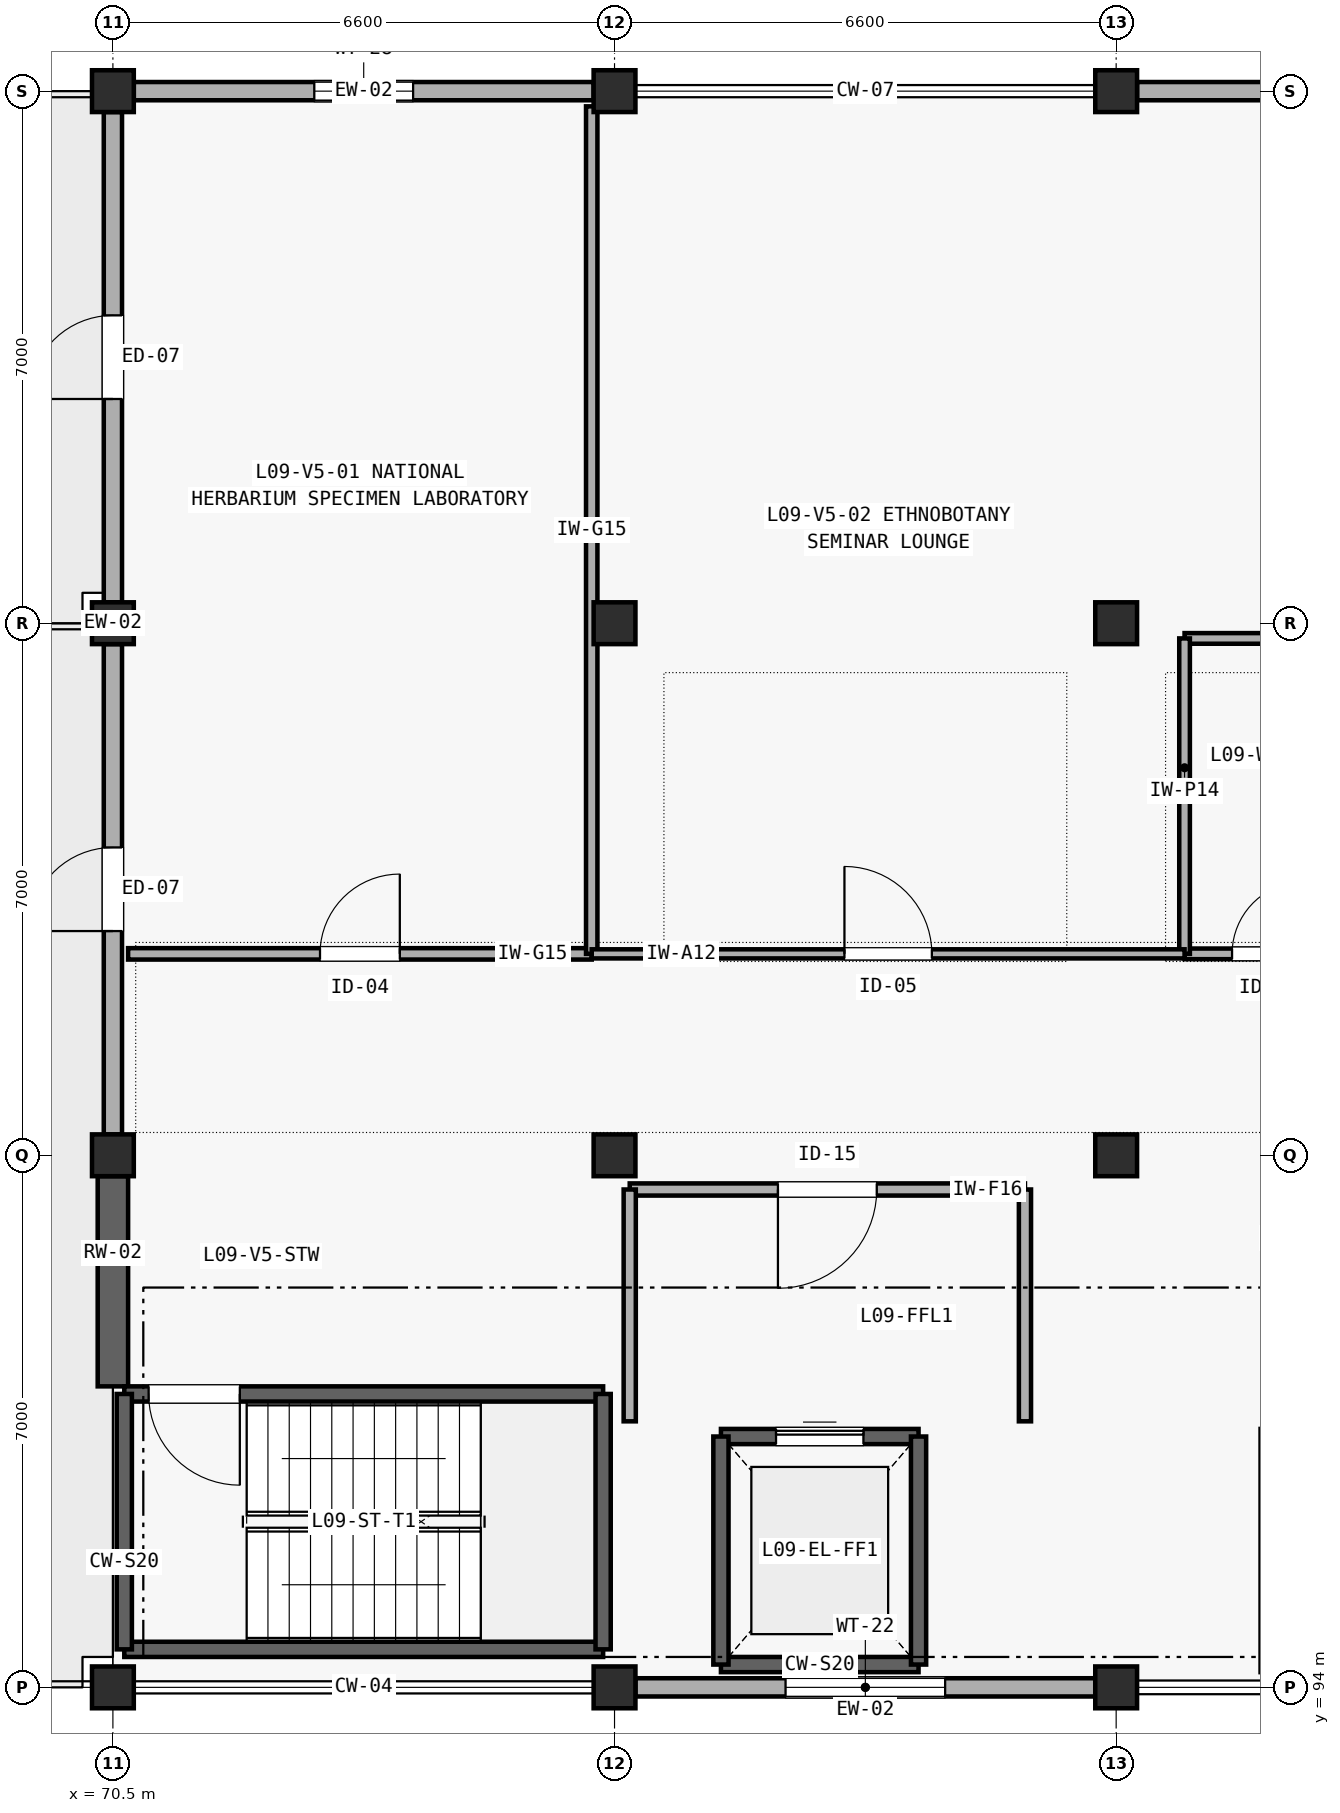
"""IFC4 building model, lengths in metres.
Left out: names, types, materials, properties, quantities, classifications, styles, units other than length and angle.
Written with IfcOpenShell. Run it as: python <this file> out.ifc"""

import sys

from ifc_helpers import new_model, si_unit, direction, frame, frame_2d, origin, origin_2d, place, context, subcontext, project, spatial, rectangle, extrude, element, fill, save


model = new_model("IFC4")
c1 = context("Model", 3, precision=1e-05, world=origin(), true_north=direction((0.0, 1.0)))
c2 = subcontext(c1, "Body", "Model", "MODEL_VIEW")
j1 = project(units=[si_unit("LENGTHUNIT", "METRE"), si_unit("PLANEANGLEUNIT", "RADIAN")], contexts=[c1])
p1 = place(None, origin())
s1 = spatial("IfcSite", under=j1, at=p1, CompositionType="ELEMENT")
p2 = place(p1, origin())
s2 = spatial("IfcBuilding", under=s1, at=p2, CompositionType="ELEMENT")
p3 = place(p2, frame((0.0, 0.0, 37.8)))
s3 = spatial("IfcBuildingStorey", under=s2, at=p3, CompositionType="ELEMENT", Elevation=37.8)
for number, where, z_axis, x_axis in (
    (1, (70.5, 94.0, 0.0), (0.0, 0.0, 1.0), (1.0, 0.0, 0.0)),
    (2, (70.5, 101.0, 0.0), (0.0, 0.0, 1.0), (1.0, 0.0, 0.0)),
    (3, (70.5, 108.0, 0.0), (0.0, 0.0, 1.0), (1.0, 0.0, 0.0)),
    (4, (70.5, 115.0, 0.0), (0.0, 0.0, 1.0), (1.0, 0.0, 0.0)),
    (5, (77.1, 94.0, 0.0), (0.0, 0.0, 1.0), (1.0, 0.0, 0.0)),
    (6, (77.1, 101.0, 0.0), (0.0, 0.0, 1.0), (1.0, 0.0, 0.0)),
    (7, (77.1, 108.0, 0.0), (0.0, 0.0, 1.0), (1.0, 0.0, 0.0)),
    (8, (77.1, 115.0, 0.0), (0.0, 0.0, 1.0), (1.0, 0.0, 0.0)),
    (9, (83.7, 94.0, 0.0), (0.0, 0.0, 1.0), (1.0, 0.0, 0.0)),
    (10, (83.7, 101.0, 0.0), (0.0, 0.0, 1.0), (1.0, 0.0, 0.0)),
    (11, (83.7, 108.0, 0.0), (0.0, 0.0, 1.0), (1.0, 0.0, 0.0)),
    (12, (83.7, 115.0, 0.0), (0.0, 0.0, 1.0), (1.0, 0.0, 0.0)),
):
    element("IfcColumn", number, at=place(p3, frame(where, z_axis=z_axis, x_axis=x_axis)), inside=s3, PredefinedType="COLUMN", context=c2, shape_type="SweptSolid", body=[
        extrude(rectangle(XDim=0.55, YDim=0.55, at=origin_2d()), origin(), (0.0, 0.0, 1.0), 4.2),
    ])
p4 = place(p3, frame((77.375, 94.0, 0.0), z_axis=(0.0, 0.0, 1.0), x_axis=(1.0, 0.0, 0.0)))
e13 = element("IfcWall", 13, at=p4, inside=s3, PredefinedType="SOLIDWALL", context=c2, shape_type="SweptSolid", body=[
    extrude(rectangle(XDim=6.05, YDim=0.24, at=frame_2d((3.025, 0.0))), origin(), (0.0, 0.0, 1.0), 3.365),
])
p5 = place(p4, frame((1.975, 0.0, 0.85)))
e14 = element("IfcOpeningElement", 14, at=p5, cuts=e13, PredefinedType="OPENING", context=c2, shape_type="SweptSolid", body=[
    extrude(rectangle(XDim=2.1, YDim=1.6, at=frame_2d((1.05, 0.8))), frame((0.0, 0.13, 0.0), z_axis=(0.0, -1.0, 0.0), x_axis=(1.0, 0.0, 0.0)), (0.0, 0.0, 1.0), 0.26),
])
p6 = place(p3, frame((70.775, 115.0, 0.0), z_axis=(0.0, 0.0, 1.0), x_axis=(1.0, 0.0, 0.0)))
e15 = element("IfcWall", 15, at=p6, inside=s3, PredefinedType="SOLIDWALL", context=c2, shape_type="SweptSolid", body=[
    extrude(rectangle(XDim=6.05, YDim=0.24, at=frame_2d((3.025, 0.0))), origin(), (0.0, 0.0, 1.0), 3.285),
])
p7 = place(p6, frame((2.375, 0.0, 0.85)))
e16 = element("IfcOpeningElement", 16, at=p7, cuts=e15, PredefinedType="OPENING", context=c2, shape_type="SweptSolid", body=[
    extrude(rectangle(XDim=1.3, YDim=1.45, at=frame_2d((0.65, 0.725))), frame((0.0, 0.13, 0.0), z_axis=(0.0, -1.0, 0.0), x_axis=(1.0, 0.0, 0.0)), (0.0, 0.0, 1.0), 0.26),
])
p8 = place(p3, frame((83.975, 115.0, 0.0), z_axis=(0.0, 0.0, 1.0), x_axis=(1.0, 0.0, 0.0)))
e17 = element("IfcWall", 17, at=p8, inside=s3, PredefinedType="SOLIDWALL", context=c2, shape_type="SweptSolid", body=[
    extrude(rectangle(XDim=6.05, YDim=0.24, at=frame_2d((3.025, 0.0))), origin(), (0.0, 0.0, 1.0), 3.385),
])
p9 = place(p8, frame((1.925, 0.0, 0.85)))
e18 = element("IfcOpeningElement", 18, at=p9, cuts=e17, PredefinedType="OPENING", context=c2, shape_type="SweptSolid", body=[
    extrude(rectangle(XDim=2.2, YDim=1.2, at=frame_2d((1.1, 0.6))), frame((0.0, 0.13, 0.0), z_axis=(0.0, -1.0, 0.0), x_axis=(1.0, 0.0, 0.0)), (0.0, 0.0, 1.0), 0.26),
])
p10 = place(p3, frame((70.5, 97.96, 0.0), z_axis=(0.0, 0.0, 1.0), x_axis=(0.0, 1.0, 0.0)))
e19 = element("IfcWall", 19, at=p10, inside=s3, PredefinedType="SHEAR", context=c2, shape_type="SweptSolid", body=[
    extrude(rectangle(XDim=2.765, YDim=0.4, at=frame_2d((1.383, 0.0))), origin(), (0.0, 0.0, 1.0), 3.85),
])
p11 = place(p3, frame((70.5, 101.275, 0.0), z_axis=(0.0, 0.0, 1.0), x_axis=(0.0, 1.0, 0.0)))
e20 = element("IfcWall", 20, at=p11, inside=s3, PredefinedType="SOLIDWALL", context=c2, shape_type="SweptSolid", body=[
    extrude(rectangle(XDim=6.45, YDim=0.24, at=frame_2d((3.225, 0.0))), origin(), (0.0, 0.0, 1.0), 3.465),
])
p12 = place(p11, frame((2.675, 0.0, 0.0)))
e21 = element("IfcOpeningElement", 21, at=p12, cuts=e20, PredefinedType="OPENING", context=c2, shape_type="SweptSolid", body=[
    extrude(rectangle(XDim=1.1, YDim=2.1, at=frame_2d((0.55, 1.05))), frame((0.0, 0.13, 0.0), z_axis=(0.0, -1.0, 0.0), x_axis=(1.0, 0.0, 0.0)), (0.0, 0.0, 1.0), 0.26),
])
p13 = place(p3, frame((70.5, 108.275, 0.0), z_axis=(0.0, 0.0, 1.0), x_axis=(0.0, 1.0, 0.0)))
e22 = element("IfcWall", 22, at=p13, inside=s3, PredefinedType="SOLIDWALL", context=c2, shape_type="SweptSolid", body=[
    extrude(rectangle(XDim=6.45, YDim=0.24, at=frame_2d((3.225, 0.0))), origin(), (0.0, 0.0, 1.0), 3.465),
])
p14 = place(p13, frame((2.675, 0.0, 0.0)))
e23 = element("IfcOpeningElement", 23, at=p14, cuts=e22, PredefinedType="OPENING", context=c2, shape_type="SweptSolid", body=[
    extrude(rectangle(XDim=1.1, YDim=2.1, at=frame_2d((0.55, 1.05))), frame((0.0, 0.13, 0.0), z_axis=(0.0, -1.0, 0.0), x_axis=(1.0, 0.0, 0.0)), (0.0, 0.0, 1.0), 0.26),
])
p15 = place(p3, frame((70.65, 94.5, 0.0), z_axis=(0.0, 0.0, 1.0), x_axis=(1.0, 0.0, 0.0)))
e24 = element("IfcWall", 24, at=p15, inside=s3, PredefinedType="SHEAR", context=c2, shape_type="SweptSolid", body=[
    extrude(rectangle(XDim=6.3, YDim=0.2, at=frame_2d((3.15, 0.0))), origin(), (0.0, 0.0, 1.0), 4.2),
])
p16 = place(p3, frame((70.65, 97.86, 0.0), z_axis=(0.0, 0.0, 1.0), x_axis=(1.0, 0.0, 0.0)))
e25 = element("IfcWall", 25, at=p16, inside=s3, PredefinedType="SHEAR", context=c2, shape_type="SweptSolid", body=[
    extrude(rectangle(XDim=6.3, YDim=0.2, at=frame_2d((3.15, 0.0))), origin(), (0.0, 0.0, 1.0), 4.2),
])
p17 = place(p16, frame((0.32, 0.0, 0.0)))
e26 = element("IfcOpeningElement", 26, at=p17, cuts=e25, PredefinedType="OPENING", context=c2, shape_type="SweptSolid", body=[
    extrude(rectangle(XDim=1.2, YDim=2.15, at=frame_2d((0.6, 1.075))), frame((0.0, 0.11, 0.0), z_axis=(0.0, -1.0, 0.0), x_axis=(1.0, 0.0, 0.0)), (0.0, 0.0, 1.0), 0.22),
])
for number, where, z_axis, x_axis in (
    (27, (70.65, 94.5, 0.0), (0.0, 0.0, 1.0), (0.0, 1.0, 0.0)),
    (28, (76.95, 94.5, 0.0), (0.0, 0.0, 1.0), (0.0, 1.0, 0.0)),
):
    element("IfcWall", number, at=place(p3, frame(where, z_axis=z_axis, x_axis=x_axis)), inside=s3, PredefinedType="SHEAR", context=c2, shape_type="SweptSolid", body=[
        extrude(rectangle(XDim=3.36, YDim=0.2, at=frame_2d((1.68, 0.0))), origin(), (0.0, 0.0, 1.0), 4.2),
    ])
p18 = place(p3, frame((78.5, 94.3, 0.0), z_axis=(0.0, 0.0, 1.0), x_axis=(1.0, 0.0, 0.0)))
e29 = element("IfcWall", 29, at=p18, inside=s3, PredefinedType="SHEAR", context=c2, shape_type="SweptSolid", body=[
    extrude(rectangle(XDim=2.6, YDim=0.2, at=frame_2d((1.3, 0.0))), origin(), (0.0, 0.0, 1.0), 4.2),
])
p19 = place(p3, frame((78.5, 97.3, 0.0), z_axis=(0.0, 0.0, 1.0), x_axis=(1.0, 0.0, 0.0)))
e30 = element("IfcWall", 30, at=p19, inside=s3, PredefinedType="SHEAR", context=c2, shape_type="SweptSolid", body=[
    extrude(rectangle(XDim=2.6, YDim=0.2, at=frame_2d((1.3, 0.0))), origin(), (0.0, 0.0, 1.0), 4.2),
])
p20 = place(p19, frame((0.725, 0.0, 0.0)))
e31 = element("IfcOpeningElement", 31, at=p20, cuts=e30, PredefinedType="OPENING", context=c2, shape_type="SweptSolid", body=[
    extrude(rectangle(XDim=1.15, YDim=2.2, at=frame_2d((0.575, 1.1))), frame((0.0, 0.11, 0.0), z_axis=(0.0, -1.0, 0.0), x_axis=(1.0, 0.0, 0.0)), (0.0, 0.0, 1.0), 0.22),
])
for number, where, z_axis, x_axis in (
    (32, (78.5, 94.3, 0.0), (0.0, 0.0, 1.0), (0.0, 1.0, 0.0)),
    (33, (81.1, 94.3, 0.0), (0.0, 0.0, 1.0), (0.0, 1.0, 0.0)),
):
    element("IfcWall", number, at=place(p3, frame(where, z_axis=z_axis, x_axis=x_axis)), inside=s3, PredefinedType="SHEAR", context=c2, shape_type="SweptSolid", body=[
        extrude(rectangle(XDim=3.0, YDim=0.2, at=frame_2d((1.5, 0.0))), origin(), (0.0, 0.0, 1.0), 4.2),
    ])
p21 = place(p3, frame((85.7, 94.2, 0.0), z_axis=(0.0, 0.0, 1.0), x_axis=(0.0, 1.0, 0.0)))
e34 = element("IfcWall", 34, at=p21, inside=s3, PredefinedType="SHEAR", context=c2, shape_type="SweptSolid", body=[
    extrude(rectangle(XDim=3.2, YDim=0.2, at=frame_2d((1.6, 0.0))), origin(), (0.0, 0.0, 1.0), 4.2),
])
p22 = place(p3, frame((77.3, 100.55, 0.0), z_axis=(0.0, 0.0, 1.0), x_axis=(1.0, 0.0, 0.0)))
e35 = element("IfcWall", 35, at=p22, inside=s3, PredefinedType="SOLIDWALL", context=c2, shape_type="SweptSolid", body=[
    extrude(rectangle(XDim=5.2, YDim=0.16, at=frame_2d((2.6, 0.0))), origin(), (0.0, 0.0, 1.0), 3.9),
])
p23 = place(p22, frame((1.95, 0.0, 0.0)))
e36 = element("IfcOpeningElement", 36, at=p23, cuts=e35, PredefinedType="OPENING", context=c2, shape_type="SweptSolid", body=[
    extrude(rectangle(XDim=1.3, YDim=2.15, at=frame_2d((0.65, 1.075))), frame((0.0, 0.09, 0.0), z_axis=(0.0, -1.0, 0.0), x_axis=(1.0, 0.0, 0.0)), (0.0, 0.0, 1.0), 0.18),
])
p24 = place(p3, frame((77.3, 97.5, 0.0), z_axis=(0.0, 0.0, 1.0), x_axis=(0.0, 1.0, 0.0)))
e37 = element("IfcWall", 37, at=p24, inside=s3, PredefinedType="SOLIDWALL", context=c2, shape_type="SweptSolid", body=[
    extrude(rectangle(XDim=3.05, YDim=0.16, at=frame_2d((1.525, 0.0))), origin(), (0.0, 0.0, 1.0), 3.405),
])
p25 = place(p3, frame((82.5, 97.5, 0.0), z_axis=(0.0, 0.0, 1.0), x_axis=(0.0, 1.0, 0.0)))
e38 = element("IfcWall", 38, at=p25, inside=s3, PredefinedType="SOLIDWALL", context=c2, shape_type="SweptSolid", body=[
    extrude(rectangle(XDim=3.05, YDim=0.16, at=frame_2d((1.525, 0.0))), origin(), (0.0, 0.0, 1.0), 3.9),
])
p26 = place(p3, frame((84.6, 103.65, 0.0), z_axis=(0.0, 0.0, 1.0), x_axis=(1.0, 0.0, 0.0)))
e39 = element("IfcWall", 39, at=p26, inside=s3, PredefinedType="PLUMBINGWALL", context=c2, shape_type="SweptSolid", body=[
    extrude(rectangle(XDim=2.2, YDim=0.14, at=frame_2d((1.1, 0.0))), origin(), (0.0, 0.0, 1.0), 3.9),
])
p27 = place(p26, frame((0.625, 0.0, 0.0)))
e40 = element("IfcOpeningElement", 40, at=p27, cuts=e39, PredefinedType="OPENING", context=c2, shape_type="SweptSolid", body=[
    extrude(rectangle(XDim=0.95, YDim=2.1, at=frame_2d((0.475, 1.05))), frame((0.0, 0.08, 0.0), z_axis=(0.0, -1.0, 0.0), x_axis=(1.0, 0.0, 0.0)), (0.0, 0.0, 1.0), 0.16),
])
p28 = place(p3, frame((84.6, 107.8, 0.0), z_axis=(0.0, 0.0, 1.0), x_axis=(1.0, 0.0, 0.0)))
e41 = element("IfcWall", 41, at=p28, inside=s3, PredefinedType="PLUMBINGWALL", context=c2, shape_type="SweptSolid", body=[
    extrude(rectangle(XDim=2.2, YDim=0.14, at=frame_2d((1.1, 0.0))), origin(), (0.0, 0.0, 1.0), 3.385),
])
p29 = place(p3, frame((84.6, 103.65, 0.0), z_axis=(0.0, 0.0, 1.0), x_axis=(0.0, 1.0, 0.0)))
e42 = element("IfcWall", 42, at=p29, inside=s3, PredefinedType="PLUMBINGWALL", context=c2, shape_type="SweptSolid", body=[
    extrude(rectangle(XDim=4.15, YDim=0.14, at=frame_2d((2.075, 0.0))), origin(), (0.0, 0.0, 1.0), 3.9),
])
p30 = place(p3, frame((70.7, 103.65, 0.0), z_axis=(0.0, 0.0, 1.0), x_axis=(1.0, 0.0, 0.0)))
e43 = element("IfcWall", 43, at=p30, inside=s3, PredefinedType="PARTITIONING", context=c2, shape_type="SweptSolid", body=[
    extrude(rectangle(XDim=6.1, YDim=0.15, at=frame_2d((3.05, 0.0))), origin(), (0.0, 0.0, 1.0), 3.9),
])
p31 = place(p30, frame((2.525, 0.0, 0.0)))
e44 = element("IfcOpeningElement", 44, at=p31, cuts=e43, PredefinedType="OPENING", context=c2, shape_type="SweptSolid", body=[
    extrude(rectangle(XDim=1.05, YDim=2.15, at=frame_2d((0.525, 1.075))), frame((0.0, 0.085, 0.0), z_axis=(0.0, -1.0, 0.0), x_axis=(1.0, 0.0, 0.0)), (0.0, 0.0, 1.0), 0.17),
])
p32 = place(p3, frame((76.8, 103.65, 0.0), z_axis=(0.0, 0.0, 1.0), x_axis=(0.0, 1.0, 0.0)))
e45 = element("IfcWall", 45, at=p32, inside=s3, PredefinedType="PARTITIONING", context=c2, shape_type="SweptSolid", body=[
    extrude(rectangle(XDim=11.15, YDim=0.15, at=frame_2d((5.575, 0.0))), origin(), (0.0, 0.0, 1.0), 3.9),
])
p33 = place(p3, frame((76.8, 103.65, 0.0), z_axis=(0.0, 0.0, 1.0), x_axis=(1.0, 0.0, 0.0)))
e46 = element("IfcWall", 46, at=p33, inside=s3, PredefinedType="PARTITIONING", context=c2, shape_type="SweptSolid", body=[
    extrude(rectangle(XDim=7.8, YDim=0.12, at=frame_2d((3.9, 0.0))), origin(), (0.0, 0.0, 1.0), 3.9),
])
p34 = place(p33, frame((3.325, 0.0, 0.0)))
e47 = element("IfcOpeningElement", 47, at=p34, cuts=e46, PredefinedType="OPENING", context=c2, shape_type="SweptSolid", body=[
    extrude(rectangle(XDim=1.15, YDim=2.15, at=frame_2d((0.575, 1.075))), frame((0.0, 0.07, 0.0), z_axis=(0.0, -1.0, 0.0), x_axis=(1.0, 0.0, 0.0)), (0.0, 0.0, 1.0), 0.14),
])
p35 = place(p5, origin())
e48 = element("IfcWindow", 48, at=p35, inside=s3, PartitioningType="SINGLE_PANEL", PredefinedType="WINDOW", context=c2, shape_type="SweptSolid", body=[
    extrude(rectangle(XDim=2.1, YDim=1.6, at=frame_2d((1.05, 0.8))), frame((0.0, 0.03, 0.0), z_axis=(0.0, -1.0, 0.0), x_axis=(1.0, 0.0, 0.0)), (0.0, 0.0, 1.0), 0.06),
])
fill(e14, e48)
p36 = place(p7, origin())
e49 = element("IfcWindow", 49, at=p36, inside=s3, PartitioningType="SINGLE_PANEL", PredefinedType="WINDOW", context=c2, shape_type="SweptSolid", body=[
    extrude(rectangle(XDim=1.3, YDim=1.45, at=frame_2d((0.65, 0.725))), frame((0.0, 0.03, 0.0), z_axis=(0.0, -1.0, 0.0), x_axis=(1.0, 0.0, 0.0)), (0.0, 0.0, 1.0), 0.06),
])
fill(e16, e49)
p37 = place(p12, origin())
e50 = element("IfcDoor", 50, at=p37, inside=s3, OperationType="SINGLE_SWING_LEFT", PredefinedType="DOOR", context=c2, shape_type="SweptSolid", body=[
    extrude(rectangle(XDim=1.1, YDim=2.1, at=frame_2d((0.55, 1.05))), frame((0.0, 0.025, 0.0), z_axis=(0.0, -1.0, 0.0), x_axis=(1.0, 0.0, 0.0)), (0.0, 0.0, 1.0), 0.05),
])
fill(e21, e50)
p38 = place(p14, origin())
e51 = element("IfcDoor", 51, at=p38, inside=s3, OperationType="SINGLE_SWING_LEFT", PredefinedType="DOOR", context=c2, shape_type="SweptSolid", body=[
    extrude(rectangle(XDim=1.1, YDim=2.1, at=frame_2d((0.55, 1.05))), frame((0.0, 0.025, 0.0), z_axis=(0.0, -1.0, 0.0), x_axis=(1.0, 0.0, 0.0)), (0.0, 0.0, 1.0), 0.05),
])
fill(e23, e51)
p39 = place(p17, frame((1.2, 0.0, 0.0), z_axis=(0.0, 0.0, 1.0), x_axis=(-1.0, 0.0, 0.0)))
e52 = element("IfcDoor", 52, at=p39, inside=s3, OperationType="SINGLE_SWING_LEFT", PredefinedType="DOOR", context=c2, shape_type="SweptSolid", body=[
    extrude(rectangle(XDim=1.2, YDim=2.15, at=frame_2d((0.6, 1.075))), frame((0.0, 0.025, 0.0), z_axis=(0.0, -1.0, 0.0), x_axis=(1.0, 0.0, 0.0)), (0.0, 0.0, 1.0), 0.05),
])
fill(e26, e52)
p40 = place(p20, origin())
e53 = element("IfcDoor", 53, at=p40, inside=s3, OperationType="SLIDING_TO_LEFT", PredefinedType="DOOR", context=c2, shape_type="SweptSolid", body=[
    extrude(rectangle(XDim=1.15, YDim=2.2, at=frame_2d((0.575, 1.1))), frame((0.0, 0.025, 0.0), z_axis=(0.0, -1.0, 0.0), x_axis=(1.0, 0.0, 0.0)), (0.0, 0.0, 1.0), 0.05),
])
fill(e31, e53)
p41 = place(p23, frame((1.3, 0.0, 0.0), z_axis=(0.0, 0.0, 1.0), x_axis=(-1.0, 0.0, 0.0)))
e54 = element("IfcDoor", 54, at=p41, inside=s3, OperationType="SINGLE_SWING_RIGHT", PredefinedType="DOOR", context=c2, shape_type="SweptSolid", body=[
    extrude(rectangle(XDim=1.3, YDim=2.15, at=frame_2d((0.65, 1.075))), frame((0.0, 0.025, 0.0), z_axis=(0.0, -1.0, 0.0), x_axis=(1.0, 0.0, 0.0)), (0.0, 0.0, 1.0), 0.05),
])
fill(e36, e54)
p42 = place(p27, origin())
e55 = element("IfcDoor", 55, at=p42, inside=s3, OperationType="SINGLE_SWING_RIGHT", PredefinedType="DOOR", context=c2, shape_type="SweptSolid", body=[
    extrude(rectangle(XDim=0.95, YDim=2.1, at=frame_2d((0.475, 1.05))), frame((0.0, 0.025, 0.0), z_axis=(0.0, -1.0, 0.0), x_axis=(1.0, 0.0, 0.0)), (0.0, 0.0, 1.0), 0.05),
])
fill(e40, e55)
p43 = place(p31, origin())
e56 = element("IfcDoor", 56, at=p43, inside=s3, OperationType="SINGLE_SWING_RIGHT", PredefinedType="DOOR", context=c2, shape_type="SweptSolid", body=[
    extrude(rectangle(XDim=1.05, YDim=2.15, at=frame_2d((0.525, 1.075))), frame((0.0, 0.025, 0.0), z_axis=(0.0, -1.0, 0.0), x_axis=(1.0, 0.0, 0.0)), (0.0, 0.0, 1.0), 0.05),
])
fill(e44, e56)
p44 = place(p34, origin())
e57 = element("IfcDoor", 57, at=p44, inside=s3, OperationType="SINGLE_SWING_LEFT", PredefinedType="DOOR", context=c2, shape_type="SweptSolid", body=[
    extrude(rectangle(XDim=1.15, YDim=2.15, at=frame_2d((0.575, 1.075))), frame((0.0, 0.025, 0.0), z_axis=(0.0, -1.0, 0.0), x_axis=(1.0, 0.0, 0.0)), (0.0, 0.0, 1.0), 0.05),
])
fill(e47, e57)
save(model, sys.argv[1])
